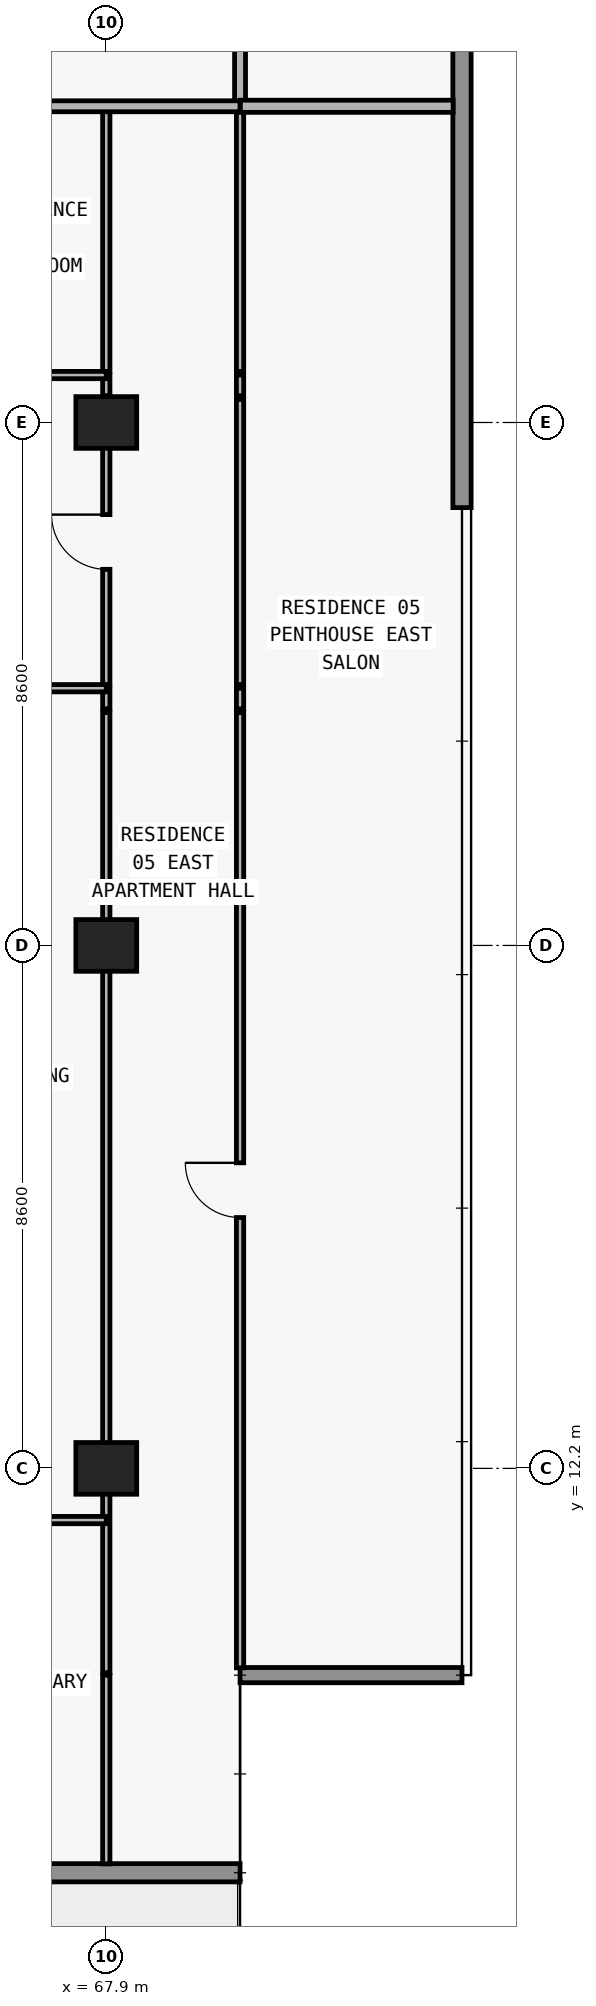
"""IFC4 building model, lengths in metres.
Left out: names, types, materials, properties, quantities, classifications, styles, units other than length and angle.
Written with IfcOpenShell. Run it as: python <this file> out.ifc"""

import sys

from ifc_helpers import new_model, si_unit, direction, frame, frame_2d, origin, origin_2d, place, context, subcontext, project, spatial, rectangle, extrude, element, fill, save


model = new_model("IFC4")
c1 = context("Model", 3, precision=1e-05, world=origin(), true_north=direction((0.0, 1.0)))
c2 = subcontext(c1, "Body", "Model", "MODEL_VIEW")
j1 = project(units=[si_unit("LENGTHUNIT", "METRE"), si_unit("PLANEANGLEUNIT", "RADIAN")], contexts=[c1])
p1 = place(None, origin())
s1 = spatial("IfcSite", under=j1, at=p1, CompositionType="ELEMENT")
p2 = place(p1, origin())
s2 = spatial("IfcBuilding", under=s1, at=p2, CompositionType="ELEMENT")
p3 = place(p2, frame((0.0, 0.0, 105.9)))
s3 = spatial("IfcBuildingStorey", under=s2, at=p3, CompositionType="ELEMENT", Elevation=105.9)
for number, where, z_axis, x_axis in (
    (1, (67.9, 12.2, 0.0), (0.0, 0.0, 1.0), (1.0, 0.0, 0.0)),
    (2, (67.9, 20.8, 0.0), (0.0, 0.0, 1.0), (1.0, 0.0, 0.0)),
    (3, (67.9, 29.4, 0.0), (0.0, 0.0, 1.0), (1.0, 0.0, 0.0)),
):
    element("IfcColumn", number, at=place(p3, frame(where, z_axis=z_axis, x_axis=x_axis)), inside=s3, PredefinedType="COLUMN", context=c2, shape_type="SweptSolid", body=[
        extrude(rectangle(XDim=1.0, YDim=0.85, at=origin_2d()), origin(), (0.0, 0.0, 1.0), 3.05),
    ])
p4 = place(p3, frame((70.1, 5.55, 0.0), z_axis=(0.0, 0.0, 1.0), x_axis=(-1.0, 0.0, 0.0)))
e4 = element("IfcWall", 4, at=p4, inside=s3, PredefinedType="STANDARD", context=c2, shape_type="SweptSolid", body=[
    extrude(rectangle(XDim=62.4, YDim=0.3, at=frame_2d((31.2, 0.0))), origin(), (0.0, 0.0, 1.0), 3.05),
])
p5 = place(p4, frame((57.226, 0.0, 0.0)))
e5 = element("IfcOpeningElement", 5, at=p5, cuts=e4, PredefinedType="OPENING", context=c2, shape_type="SweptSolid", body=[
    extrude(rectangle(XDim=2.0, YDim=2.3, at=frame_2d((1.0, 1.15))), frame((0.0, 0.16, 0.0), z_axis=(0.0, -1.0, 0.0), x_axis=(1.0, 0.0, 0.0)), (0.0, 0.0, 1.0), 0.32),
])
p6 = place(p4, frame((52.926, 0.0, 0.85)))
e6 = element("IfcOpeningElement", 6, at=p6, cuts=e4, PredefinedType="OPENING", context=c2, shape_type="SweptSolid", body=[
    extrude(rectangle(XDim=2.2, YDim=1.55, at=frame_2d((1.1, 0.775))), frame((0.0, 0.16, 0.0), z_axis=(0.0, -1.0, 0.0), x_axis=(1.0, 0.0, 0.0)), (0.0, 0.0, 1.0), 0.32),
])
p7 = place(p4, frame((48.49, 0.0, 0.0)))
e7 = element("IfcOpeningElement", 7, at=p7, cuts=e4, PredefinedType="OPENING", context=c2, shape_type="SweptSolid", body=[
    extrude(rectangle(XDim=2.0, YDim=2.3, at=frame_2d((1.0, 1.15))), frame((0.0, 0.16, 0.0), z_axis=(0.0, -1.0, 0.0), x_axis=(1.0, 0.0, 0.0)), (0.0, 0.0, 1.0), 0.32),
])
p8 = place(p4, frame((44.39, 0.0, 0.85)))
e8 = element("IfcOpeningElement", 8, at=p8, cuts=e4, PredefinedType="OPENING", context=c2, shape_type="SweptSolid", body=[
    extrude(rectangle(XDim=1.8, YDim=1.55, at=frame_2d((0.9, 0.775))), frame((0.0, 0.16, 0.0), z_axis=(0.0, -1.0, 0.0), x_axis=(1.0, 0.0, 0.0)), (0.0, 0.0, 1.0), 0.32),
])
p9 = place(p4, frame((40.49, 0.0, 0.0)))
e9 = element("IfcOpeningElement", 9, at=p9, cuts=e4, PredefinedType="OPENING", context=c2, shape_type="SweptSolid", body=[
    extrude(rectangle(XDim=2.0, YDim=2.3, at=frame_2d((1.0, 1.15))), frame((0.0, 0.16, 0.0), z_axis=(0.0, -1.0, 0.0), x_axis=(1.0, 0.0, 0.0)), (0.0, 0.0, 1.0), 0.32),
])
p10 = place(p4, frame((35.81, 0.0, 0.65)))
e10 = element("IfcOpeningElement", 10, at=p10, cuts=e4, PredefinedType="OPENING", context=c2, shape_type="SweptSolid", body=[
    extrude(rectangle(XDim=2.6, YDim=1.85, at=frame_2d((1.3, 0.925))), frame((0.0, 0.16, 0.0), z_axis=(0.0, -1.0, 0.0), x_axis=(1.0, 0.0, 0.0)), (0.0, 0.0, 1.0), 0.32),
])
p11 = place(p4, frame((30.1, 0.0, 0.85)))
e11 = element("IfcOpeningElement", 11, at=p11, cuts=e4, PredefinedType="OPENING", context=c2, shape_type="SweptSolid", body=[
    extrude(rectangle(XDim=2.2, YDim=1.55, at=frame_2d((1.1, 0.775))), frame((0.0, 0.16, 0.0), z_axis=(0.0, -1.0, 0.0), x_axis=(1.0, 0.0, 0.0)), (0.0, 0.0, 1.0), 0.32),
])
p12 = place(p4, frame((22.1, 0.0, 0.85)))
e12 = element("IfcOpeningElement", 12, at=p12, cuts=e4, PredefinedType="OPENING", context=c2, shape_type="SweptSolid", body=[
    extrude(rectangle(XDim=2.2, YDim=1.55, at=frame_2d((1.1, 0.775))), frame((0.0, 0.16, 0.0), z_axis=(0.0, -1.0, 0.0), x_axis=(1.0, 0.0, 0.0)), (0.0, 0.0, 1.0), 0.32),
])
p13 = place(p4, frame((15.69, 0.0, 0.0)))
e13 = element("IfcOpeningElement", 13, at=p13, cuts=e4, PredefinedType="OPENING", context=c2, shape_type="SweptSolid", body=[
    extrude(rectangle(XDim=2.0, YDim=2.3, at=frame_2d((1.0, 1.15))), frame((0.0, 0.16, 0.0), z_axis=(0.0, -1.0, 0.0), x_axis=(1.0, 0.0, 0.0)), (0.0, 0.0, 1.0), 0.32),
])
p14 = place(p4, frame((11.59, 0.0, 0.85)))
e14 = element("IfcOpeningElement", 14, at=p14, cuts=e4, PredefinedType="OPENING", context=c2, shape_type="SweptSolid", body=[
    extrude(rectangle(XDim=1.8, YDim=1.55, at=frame_2d((0.9, 0.775))), frame((0.0, 0.16, 0.0), z_axis=(0.0, -1.0, 0.0), x_axis=(1.0, 0.0, 0.0)), (0.0, 0.0, 1.0), 0.32),
])
p15 = place(p4, frame((7.626, 0.0, 0.0)))
e15 = element("IfcOpeningElement", 15, at=p15, cuts=e4, PredefinedType="OPENING", context=c2, shape_type="SweptSolid", body=[
    extrude(rectangle(XDim=2.0, YDim=2.3, at=frame_2d((1.0, 1.15))), frame((0.0, 0.16, 0.0), z_axis=(0.0, -1.0, 0.0), x_axis=(1.0, 0.0, 0.0)), (0.0, 0.0, 1.0), 0.32),
])
p16 = place(p4, frame((3.326, 0.0, 0.85)))
e16 = element("IfcOpeningElement", 16, at=p16, cuts=e4, PredefinedType="OPENING", context=c2, shape_type="SweptSolid", body=[
    extrude(rectangle(XDim=2.2, YDim=1.55, at=frame_2d((1.1, 0.775))), frame((0.0, 0.16, 0.0), z_axis=(0.0, -1.0, 0.0), x_axis=(1.0, 0.0, 0.0)), (0.0, 0.0, 1.0), 0.32),
])
p17 = place(p3, frame((70.1, 8.8, 0.0), z_axis=(0.0, 0.0, 1.0), x_axis=(1.0, 0.0, 0.0)))
e17 = element("IfcWall", 17, at=p17, inside=s3, PredefinedType="ELEMENTEDWALL", context=c2, shape_type="SweptSolid", body=[
    extrude(rectangle(XDim=3.65, YDim=0.25, at=frame_2d((1.825, 0.0))), origin(), (0.0, 0.0, 1.0), 3.05),
])
p18 = place(p3, frame((73.75, 47.2, 0.0), z_axis=(0.0, 0.0, 1.0), x_axis=(0.0, -1.0, 0.0)))
e18 = element("IfcWall", 18, at=p18, inside=s3, PredefinedType="STANDARD", context=c2, shape_type="SweptSolid", body=[
    extrude(rectangle(XDim=19.2, YDim=0.3, at=frame_2d((9.6, 0.0))), origin(), (0.0, 0.0, 1.0), 3.05),
])
p19 = place(p3, frame((67.9, 5.695, 0.0), z_axis=(0.0, 0.0, 1.0), x_axis=(0.0, 1.0, 0.0)))
e19 = element("IfcWall", 19, at=p19, inside=s3, PredefinedType="PARTITIONING", context=c2, shape_type="SweptSolid", body=[
    extrude(rectangle(XDim=3.105, YDim=0.12, at=frame_2d((1.552, 0.0))), origin(), (0.0, 0.0, 1.0), 3.05),
])
p20 = place(p3, frame((67.9, 8.84, 0.0), z_axis=(0.0, 0.0, 1.0), x_axis=(0.0, 1.0, 0.0)))
e20 = element("IfcWall", 20, at=p20, inside=s3, PredefinedType="PARTITIONING", context=c2, shape_type="SweptSolid", body=[
    extrude(rectangle(XDim=15.79, YDim=0.12, at=frame_2d((7.895, 0.0))), origin(), (0.0, 0.0, 1.0), 2.174),
])
p21 = place(p3, frame((67.9, 24.69, 0.0), z_axis=(0.0, 0.0, 1.0), x_axis=(0.0, 1.0, 0.0)))
e21 = element("IfcWall", 21, at=p21, inside=s3, PredefinedType="PARTITIONING", context=c2, shape_type="SweptSolid", body=[
    extrude(rectangle(XDim=0.34, YDim=0.12, at=frame_2d((0.17, 0.0))), origin(), (0.0, 0.0, 1.0), 2.174),
])
p22 = place(p3, frame((67.9, 25.09, 0.0), z_axis=(0.0, 0.0, 1.0), x_axis=(0.0, 1.0, 0.0)))
e22 = element("IfcWall", 22, at=p22, inside=s3, PredefinedType="PARTITIONING", context=c2, shape_type="SweptSolid", body=[
    extrude(rectangle(XDim=4.69, YDim=0.12, at=frame_2d((2.345, 0.0))), origin(), (0.0, 0.0, 1.0), 2.174),
])
p23 = place(p22, frame((1.895, 0.0, 0.0)))
e23 = element("IfcOpeningElement", 23, at=p23, cuts=e22, PredefinedType="OPENING", context=c2, shape_type="SweptSolid", body=[
    extrude(rectangle(XDim=0.9, YDim=2.124, at=frame_2d((0.45, 1.062))), frame((0.0, 0.07, 0.0), z_axis=(0.0, -1.0, 0.0), x_axis=(1.0, 0.0, 0.0)), (0.0, 0.0, 1.0), 0.14),
])
p24 = place(p3, frame((67.9, 29.84, 0.0), z_axis=(0.0, 0.0, 1.0), x_axis=(0.0, 1.0, 0.0)))
e24 = element("IfcWall", 24, at=p24, inside=s3, PredefinedType="PARTITIONING", context=c2, shape_type="SweptSolid", body=[
    extrude(rectangle(XDim=0.34, YDim=0.12, at=frame_2d((0.17, 0.0))), origin(), (0.0, 0.0, 1.0), 2.174),
])
p25 = place(p3, frame((67.9, 30.24, 0.0), z_axis=(0.0, 0.0, 1.0), x_axis=(0.0, 1.0, 0.0)))
e25 = element("IfcWall", 25, at=p25, inside=s3, PredefinedType="PARTITIONING", context=c2, shape_type="SweptSolid", body=[
    extrude(rectangle(XDim=4.36, YDim=0.12, at=frame_2d((2.18, 0.0))), origin(), (0.0, 0.0, 1.0), 2.174),
])
p26 = place(p3, frame((70.1, 8.92, 0.0), z_axis=(0.0, 0.0, 1.0), x_axis=(0.0, 1.0, 0.0)))
e26 = element("IfcWall", 26, at=p26, inside=s3, PredefinedType="PARTITIONING", context=c2, shape_type="SweptSolid", body=[
    extrude(rectangle(XDim=15.71, YDim=0.12, at=frame_2d((7.855, 0.0))), origin(), (0.0, 0.0, 1.0), 3.05),
])
p27 = place(p26, frame((7.405, 0.0, 0.0)))
e27 = element("IfcOpeningElement", 27, at=p27, cuts=e26, PredefinedType="OPENING", context=c2, shape_type="SweptSolid", body=[
    extrude(rectangle(XDim=0.9, YDim=2.15, at=frame_2d((0.45, 1.075))), frame((0.0, 0.07, 0.0), z_axis=(0.0, -1.0, 0.0), x_axis=(1.0, 0.0, 0.0)), (0.0, 0.0, 1.0), 0.14),
])
p28 = place(p3, frame((70.1, 24.69, 0.0), z_axis=(0.0, 0.0, 1.0), x_axis=(0.0, 1.0, 0.0)))
e28 = element("IfcWall", 28, at=p28, inside=s3, PredefinedType="PARTITIONING", context=c2, shape_type="SweptSolid", body=[
    extrude(rectangle(XDim=0.34, YDim=0.12, at=frame_2d((0.17, 0.0))), origin(), (0.0, 0.0, 1.0), 3.05),
])
p29 = place(p3, frame((70.1, 25.09, 0.0), z_axis=(0.0, 0.0, 1.0), x_axis=(0.0, 1.0, 0.0)))
e29 = element("IfcWall", 29, at=p29, inside=s3, PredefinedType="PARTITIONING", context=c2, shape_type="SweptSolid", body=[
    extrude(rectangle(XDim=4.69, YDim=0.12, at=frame_2d((2.345, 0.0))), origin(), (0.0, 0.0, 1.0), 3.05),
])
p30 = place(p3, frame((70.1, 29.84, 0.0), z_axis=(0.0, 0.0, 1.0), x_axis=(0.0, 1.0, 0.0)))
e30 = element("IfcWall", 30, at=p30, inside=s3, PredefinedType="PARTITIONING", context=c2, shape_type="SweptSolid", body=[
    extrude(rectangle(XDim=0.34, YDim=0.12, at=frame_2d((0.17, 0.0))), origin(), (0.0, 0.0, 1.0), 3.05),
])
p31 = place(p3, frame((70.1, 30.24, 0.0), z_axis=(0.0, 0.0, 1.0), x_axis=(0.0, 1.0, 0.0)))
e31 = element("IfcWall", 31, at=p31, inside=s3, PredefinedType="PARTITIONING", context=c2, shape_type="SweptSolid", body=[
    extrude(rectangle(XDim=4.36, YDim=0.12, at=frame_2d((2.18, 0.0))), origin(), (0.0, 0.0, 1.0), 3.05),
])
p32 = place(p3, frame((70.1, 34.605, 0.0), z_axis=(0.0, 0.0, 1.0), x_axis=(0.0, 1.0, 0.0)))
e32 = element("IfcWall", 32, at=p32, inside=s3, PredefinedType="PARTITIONING", context=c2, shape_type="SweptSolid", body=[
    extrude(rectangle(XDim=2.345, YDim=0.18, at=frame_2d((1.172, 0.0))), origin(), (0.0, 0.0, 1.0), 3.05),
])
p33 = place(p3, frame((63.448, 11.35, 0.0), z_axis=(0.0, 0.0, 1.0), x_axis=(1.0, 0.0, 0.0)))
e33 = element("IfcWall", 33, at=p33, inside=s3, PredefinedType="PARTITIONING", context=c2, shape_type="SweptSolid", body=[
    extrude(rectangle(XDim=4.452, YDim=0.12, at=frame_2d((2.226, 0.0))), origin(), (0.0, 0.0, 1.0), 3.05),
])
p34 = place(p33, frame((1.776, 0.0, 0.0)))
e34 = element("IfcOpeningElement", 34, at=p34, cuts=e33, PredefinedType="OPENING", context=c2, shape_type="SweptSolid", body=[
    extrude(rectangle(XDim=0.9, YDim=2.15, at=frame_2d((0.45, 1.075))), frame((0.0, 0.07, 0.0), z_axis=(0.0, -1.0, 0.0), x_axis=(1.0, 0.0, 0.0)), (0.0, 0.0, 1.0), 0.14),
])
p35 = place(p3, frame((59.55, 25.03, 0.0), z_axis=(0.0, 0.0, 1.0), x_axis=(1.0, 0.0, 0.0)))
e35 = element("IfcWall", 35, at=p35, inside=s3, PredefinedType="PARTITIONING", context=c2, shape_type="SweptSolid", body=[
    extrude(rectangle(XDim=8.35, YDim=0.12, at=frame_2d((4.175, 0.0))), origin(), (0.0, 0.0, 1.0), 3.05),
])
p36 = place(p35, frame((1.499, 0.0, 0.0)))
e36 = element("IfcOpeningElement", 36, at=p36, cuts=e35, PredefinedType="OPENING", context=c2, shape_type="SweptSolid", body=[
    extrude(rectangle(XDim=0.9, YDim=2.15, at=frame_2d((0.45, 1.075))), frame((0.0, 0.07, 0.0), z_axis=(0.0, -1.0, 0.0), x_axis=(1.0, 0.0, 0.0)), (0.0, 0.0, 1.0), 0.14),
])
p37 = place(p35, frame((5.968, 0.0, 0.0)))
e37 = element("IfcOpeningElement", 37, at=p37, cuts=e35, PredefinedType="OPENING", context=c2, shape_type="SweptSolid", body=[
    extrude(rectangle(XDim=0.9, YDim=2.15, at=frame_2d((0.45, 1.075))), frame((0.0, 0.07, 0.0), z_axis=(0.0, -1.0, 0.0), x_axis=(1.0, 0.0, 0.0)), (0.0, 0.0, 1.0), 0.14),
])
p38 = place(p3, frame((59.55, 30.18, 0.0), z_axis=(0.0, 0.0, 1.0), x_axis=(1.0, 0.0, 0.0)))
e38 = element("IfcWall", 38, at=p38, inside=s3, PredefinedType="PARTITIONING", context=c2, shape_type="SweptSolid", body=[
    extrude(rectangle(XDim=8.35, YDim=0.12, at=frame_2d((4.175, 0.0))), origin(), (0.0, 0.0, 1.0), 3.05),
])
p39 = place(p38, frame((1.793, 0.0, 0.0)))
e39 = element("IfcOpeningElement", 39, at=p39, cuts=e38, PredefinedType="OPENING", context=c2, shape_type="SweptSolid", body=[
    extrude(rectangle(XDim=0.9, YDim=2.15, at=frame_2d((0.45, 1.075))), frame((0.0, 0.07, 0.0), z_axis=(0.0, -1.0, 0.0), x_axis=(1.0, 0.0, 0.0)), (0.0, 0.0, 1.0), 0.14),
])
p40 = place(p3, frame((59.55, 34.6, 0.0), z_axis=(0.0, 0.0, 1.0), x_axis=(1.0, 0.0, 0.0)))
e40 = element("IfcWall", 40, at=p40, inside=s3, PredefinedType="PARTITIONING", context=c2, shape_type="SweptSolid", body=[
    extrude(rectangle(XDim=10.55, YDim=0.18, at=frame_2d((5.275, 0.0))), origin(), (0.0, 0.0, 1.0), 3.05),
])
p41 = place(p40, frame((2.51, 0.0, 0.0)))
e41 = element("IfcOpeningElement", 41, at=p41, cuts=e40, PredefinedType="OPENING", context=c2, shape_type="SweptSolid", body=[
    extrude(rectangle(XDim=1.0, YDim=2.2, at=frame_2d((0.5, 1.1))), frame((0.0, 0.1, 0.0), z_axis=(0.0, -1.0, 0.0), x_axis=(1.0, 0.0, 0.0)), (0.0, 0.0, 1.0), 0.2),
])
p42 = place(p3, frame((70.105, 34.6, 0.0), z_axis=(0.0, 0.0, 1.0), x_axis=(1.0, 0.0, 0.0)))
e42 = element("IfcWall", 42, at=p42, inside=s3, PredefinedType="PARTITIONING", context=c2, shape_type="SweptSolid", body=[
    extrude(rectangle(XDim=3.5, YDim=0.2, at=frame_2d((1.75, 0.0))), origin(), (0.0, 0.0, 1.0), 3.05),
])
p43 = place(p23, origin())
e43 = element("IfcDoor", 43, at=p43, inside=s3, OperationType="SINGLE_SWING_RIGHT", PredefinedType="DOOR", context=c2, shape_type="SweptSolid", body=[
    extrude(rectangle(XDim=0.9, YDim=2.124, at=frame_2d((0.45, 1.062))), frame((0.0, 0.025, 0.0), z_axis=(0.0, -1.0, 0.0), x_axis=(1.0, 0.0, 0.0)), (0.0, 0.0, 1.0), 0.05),
])
fill(e23, e43)
p44 = place(p27, origin())
e44 = element("IfcDoor", 44, at=p44, inside=s3, OperationType="SINGLE_SWING_RIGHT", PredefinedType="DOOR", context=c2, shape_type="SweptSolid", body=[
    extrude(rectangle(XDim=0.9, YDim=2.15, at=frame_2d((0.45, 1.075))), frame((0.0, 0.025, 0.0), z_axis=(0.0, -1.0, 0.0), x_axis=(1.0, 0.0, 0.0)), (0.0, 0.0, 1.0), 0.05),
])
fill(e27, e44)
save(model, sys.argv[1])
